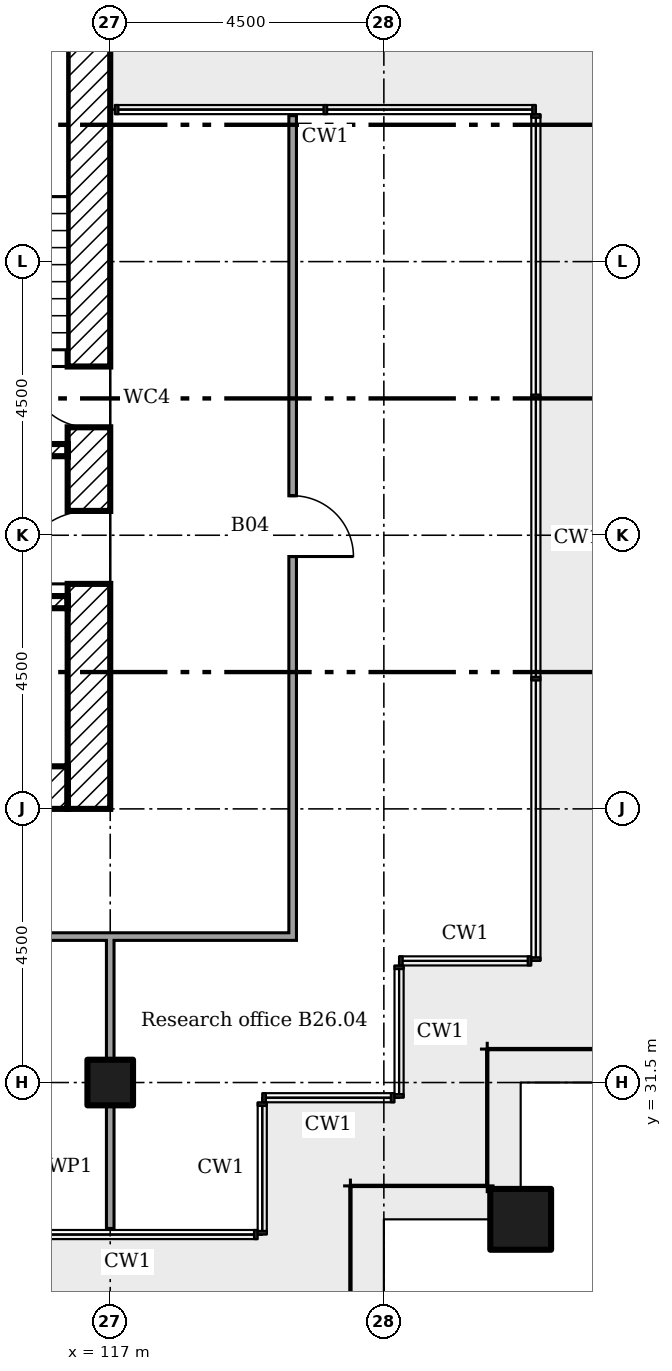
"""IFC4 building model, lengths in metres.
Left out: names, types, materials, properties, quantities, classifications, styles, units other than length and angle.
Written with IfcOpenShell. Run it as: python <this file> out.ifc"""

import sys

from ifc_helpers import new_model, si_unit, direction, frame, frame_2d, origin, origin_2d, place, context, subcontext, project, spatial, rectangle, extrude, element, fill, save


model = new_model("IFC4")
c1 = context("Model", 3, precision=1e-05, world=origin(), true_north=direction((0.0, 1.0)))
c2 = subcontext(c1, "Body", "Model", "MODEL_VIEW")
j1 = project(units=[si_unit("LENGTHUNIT", "METRE"), si_unit("PLANEANGLEUNIT", "RADIAN")], contexts=[c1])
p1 = place(None, origin())
s1 = spatial("IfcSite", under=j1, at=p1, CompositionType="ELEMENT")
p2 = place(p1, origin())
s2 = spatial("IfcBuilding", under=s1, at=p2, CompositionType="ELEMENT")
p3 = place(p2, frame((0.0, 0.0, 106.4)))
s3 = spatial("IfcBuildingStorey", under=s2, at=p3, CompositionType="ELEMENT", Elevation=106.4)
p4 = place(p3, frame((123.75, 29.25, 0.0)))
e1 = element("IfcColumn", 1, at=p4, inside=s3, PredefinedType="COLUMN", context=c2, shape_type="SweptSolid", body=[
    extrude(rectangle(XDim=1.0, YDim=1.0, at=origin_2d()), origin(), (0.0, 0.0, 1.0), 3.6),
])
p5 = place(p3, frame((117.0, 31.5, 0.0)))
e2 = element("IfcColumn", 2, at=p5, inside=s3, PredefinedType="COLUMN", context=c2, shape_type="SweptSolid", body=[
    extrude(rectangle(XDim=0.75, YDim=0.75, at=origin_2d()), origin(), (0.0, 0.0, 1.0), 3.6),
])
p6 = place(p3, frame((116.65, 36.0, 0.0), z_axis=(0.0, 0.0, 1.0), x_axis=(0.0, 1.0, 0.0)))
e3 = element("IfcWall", 3, at=p6, inside=s3, PredefinedType="SHEAR", context=c2, shape_type="SweptSolid", body=[
    extrude(rectangle(XDim=13.5, YDim=0.7, at=frame_2d((6.75, 0.0))), origin(), (0.0, 0.0, 1.0), 3.35),
])
p7 = place(p6, frame((3.7, 0.0, 0.0)))
e4 = element("IfcOpeningElement", 4, at=p7, cuts=e3, PredefinedType="OPENING", context=c2, shape_type="SweptSolid", body=[
    extrude(rectangle(XDim=1.2, YDim=2.1, at=frame_2d((0.6, 1.05))), frame((0.0, 0.36, 0.0), z_axis=(0.0, -1.0, 0.0), x_axis=(1.0, 0.0, 0.0)), (0.0, 0.0, 1.0), 0.72),
])
p8 = place(p6, frame((6.275, 0.0, 0.0)))
e5 = element("IfcOpeningElement", 5, at=p8, cuts=e3, PredefinedType="OPENING", context=c2, shape_type="SweptSolid", body=[
    extrude(rectangle(XDim=1.0, YDim=2.1, at=frame_2d((0.5, 1.05))), frame((0.0, 0.36, 0.0), z_axis=(0.0, -1.0, 0.0), x_axis=(1.0, 0.0, 0.0)), (0.0, 0.0, 1.0), 0.72),
])
p9 = place(p3, frame((104.2, 36.35, 0.0)))
e6 = element("IfcWall", 6, at=p9, inside=s3, PredefinedType="SHEAR", context=c2, shape_type="SweptSolid", body=[
    extrude(rectangle(XDim=12.1, YDim=0.7, at=frame_2d((6.05, 0.0))), origin(), (0.0, 0.0, 1.0), 3.35),
])
p10 = place(p3, frame((107.2, 39.4, 0.0)))
e7 = element("IfcWall", 7, at=p10, inside=s3, PredefinedType="SHEAR", context=c2, shape_type="SweptSolid", body=[
    extrude(rectangle(XDim=9.1, YDim=0.2, at=frame_2d((4.55, 0.0))), origin(), (0.0, 0.0, 1.0), 3.35),
])
p11 = place(p10, frame((0.867, 0.0, 0.0)))
e8 = element("IfcOpeningElement", 8, at=p11, cuts=e7, PredefinedType="OPENING", context=c2, shape_type="SweptSolid", body=[
    extrude(rectangle(XDim=1.2, YDim=2.1, at=frame_2d((0.6, 1.05))), frame((0.0, 0.11, 0.0), z_axis=(0.0, -1.0, 0.0), x_axis=(1.0, 0.0, 0.0)), (0.0, 0.0, 1.0), 0.22),
])
p12 = place(p10, frame((3.8, 0.0, 0.0)))
e9 = element("IfcOpeningElement", 9, at=p12, cuts=e7, PredefinedType="OPENING", context=c2, shape_type="SweptSolid", body=[
    extrude(rectangle(XDim=1.2, YDim=2.1, at=frame_2d((0.6, 1.05))), frame((0.0, 0.11, 0.0), z_axis=(0.0, -1.0, 0.0), x_axis=(1.0, 0.0, 0.0)), (0.0, 0.0, 1.0), 0.22),
])
p13 = place(p10, frame((6.733, 0.0, 0.0)))
e10 = element("IfcOpeningElement", 10, at=p13, cuts=e7, PredefinedType="OPENING", context=c2, shape_type="SweptSolid", body=[
    extrude(rectangle(XDim=1.2, YDim=2.1, at=frame_2d((0.6, 1.05))), frame((0.0, 0.11, 0.0), z_axis=(0.0, -1.0, 0.0), x_axis=(1.0, 0.0, 0.0)), (0.0, 0.0, 1.0), 0.22),
])
p14 = place(p3, frame((113.5, 41.9, 0.0)))
e11 = element("IfcWall", 11, at=p14, inside=s3, PredefinedType="SHEAR", context=c2, shape_type="SweptSolid", body=[
    extrude(rectangle(XDim=2.8, YDim=0.2, at=frame_2d((1.4, 0.0))), origin(), (0.0, 0.0, 1.0), 3.35),
])
p15 = place(p14, frame((0.75, 0.0, 0.0)))
e12 = element("IfcOpeningElement", 12, at=p15, cuts=e11, PredefinedType="OPENING", context=c2, shape_type="SweptSolid", body=[
    extrude(rectangle(XDim=1.0, YDim=2.1, at=frame_2d((0.5, 1.05))), frame((0.0, 0.11, 0.0), z_axis=(0.0, -1.0, 0.0), x_axis=(1.0, 0.0, 0.0)), (0.0, 0.0, 1.0), 0.22),
])
p16 = place(p3, frame((99.837, 33.9, 0.0)))
e13 = element("IfcWall", 13, at=p16, inside=s3, PredefinedType="PARTITIONING", context=c2, shape_type="SweptSolid", body=[
    extrude(rectangle(XDim=20.225, YDim=0.125, at=frame_2d((10.113, 0.0))), origin(), (0.0, 0.0, 1.0), 3.45),
])
p17 = place(p16, frame((1.47, 0.0, 0.0)))
e14 = element("IfcOpeningElement", 14, at=p17, cuts=e13, PredefinedType="OPENING", context=c2, shape_type="SweptSolid", body=[
    extrude(rectangle(XDim=1.0, YDim=2.1, at=frame_2d((0.5, 1.05))), frame((0.0, 0.073, 0.0), z_axis=(0.0, -1.0, 0.0), x_axis=(1.0, 0.0, 0.0)), (0.0, 0.0, 1.0), 0.145),
])
p18 = place(p16, frame((11.942, 0.0, 0.0)))
e15 = element("IfcOpeningElement", 15, at=p18, cuts=e13, PredefinedType="OPENING", context=c2, shape_type="SweptSolid", body=[
    extrude(rectangle(XDim=1.0, YDim=2.1, at=frame_2d((0.5, 1.05))), frame((0.0, 0.073, 0.0), z_axis=(0.0, -1.0, 0.0), x_axis=(1.0, 0.0, 0.0)), (0.0, 0.0, 1.0), 0.145),
])
for number, where, z_axis, x_axis in (
    (16, (117.0, 29.1, 0.0), (0.0, 0.0, 1.0), (0.0, 1.0, 0.0)),
    (17, (117.0, 31.875, 0.0), (0.0, 0.0, 1.0), (0.0, 1.0, 0.0)),
):
    element("IfcWall", number, at=place(p3, frame(where, z_axis=z_axis, x_axis=x_axis)), inside=s3, PredefinedType="PARTITIONING", context=c2, shape_type="SweptSolid", body=[
        extrude(rectangle(XDim=2.025, YDim=0.125, at=frame_2d((1.012, 0.0))), origin(), (0.0, 0.0, 1.0), 2.842),
    ])
p19 = place(p3, frame((120.0, 33.962, 0.0), z_axis=(0.0, 0.0, 1.0), x_axis=(0.0, 1.0, 0.0)))
e18 = element("IfcWall", 18, at=p19, inside=s3, PredefinedType="PARTITIONING", context=c2, shape_type="SweptSolid", body=[
    extrude(rectangle(XDim=13.438, YDim=0.125, at=frame_2d((6.719, 0.0))), origin(), (0.0, 0.0, 1.0), 3.45),
])
p20 = place(p19, frame((6.188, 0.0, 0.0)))
e19 = element("IfcOpeningElement", 19, at=p20, cuts=e18, PredefinedType="OPENING", context=c2, shape_type="SweptSolid", body=[
    extrude(rectangle(XDim=1.0, YDim=2.1, at=frame_2d((0.5, 1.05))), frame((0.0, 0.073, 0.0), z_axis=(0.0, -1.0, 0.0), x_axis=(1.0, 0.0, 0.0)), (0.0, 0.0, 1.0), 0.145),
])
p21 = place(p7, origin())
e20 = element("IfcDoor", 20, at=p21, inside=s3, OperationType="SINGLE_SWING_RIGHT", PredefinedType="DOOR", context=c2, shape_type="SweptSolid", body=[
    extrude(rectangle(XDim=1.2, YDim=2.1, at=frame_2d((0.6, 1.05))), frame((0.0, 0.025, 0.0), z_axis=(0.0, -1.0, 0.0), x_axis=(1.0, 0.0, 0.0)), (0.0, 0.0, 1.0), 0.05),
])
fill(e4, e20)
p22 = place(p8, origin())
e21 = element("IfcDoor", 21, at=p22, inside=s3, OperationType="SINGLE_SWING_LEFT", PredefinedType="DOOR", context=c2, shape_type="SweptSolid", body=[
    extrude(rectangle(XDim=1.0, YDim=2.1, at=frame_2d((0.5, 1.05))), frame((0.0, 0.025, 0.0), z_axis=(0.0, -1.0, 0.0), x_axis=(1.0, 0.0, 0.0)), (0.0, 0.0, 1.0), 0.05),
])
fill(e5, e21)
p23 = place(p20, frame((1.0, 0.0, 0.0), x_axis=(-1.0, 0.0, 0.0)))
e22 = element("IfcDoor", 22, at=p23, inside=s3, OperationType="SINGLE_SWING_LEFT", PredefinedType="DOOR", context=c2, shape_type="SweptSolid", body=[
    extrude(rectangle(XDim=1.0, YDim=2.1, at=frame_2d((0.5, 1.05))), frame((0.0, 0.025, 0.0), z_axis=(0.0, -1.0, 0.0), x_axis=(1.0, 0.0, 0.0)), (0.0, 0.0, 1.0), 0.05),
])
fill(e19, e22)
save(model, sys.argv[1])
